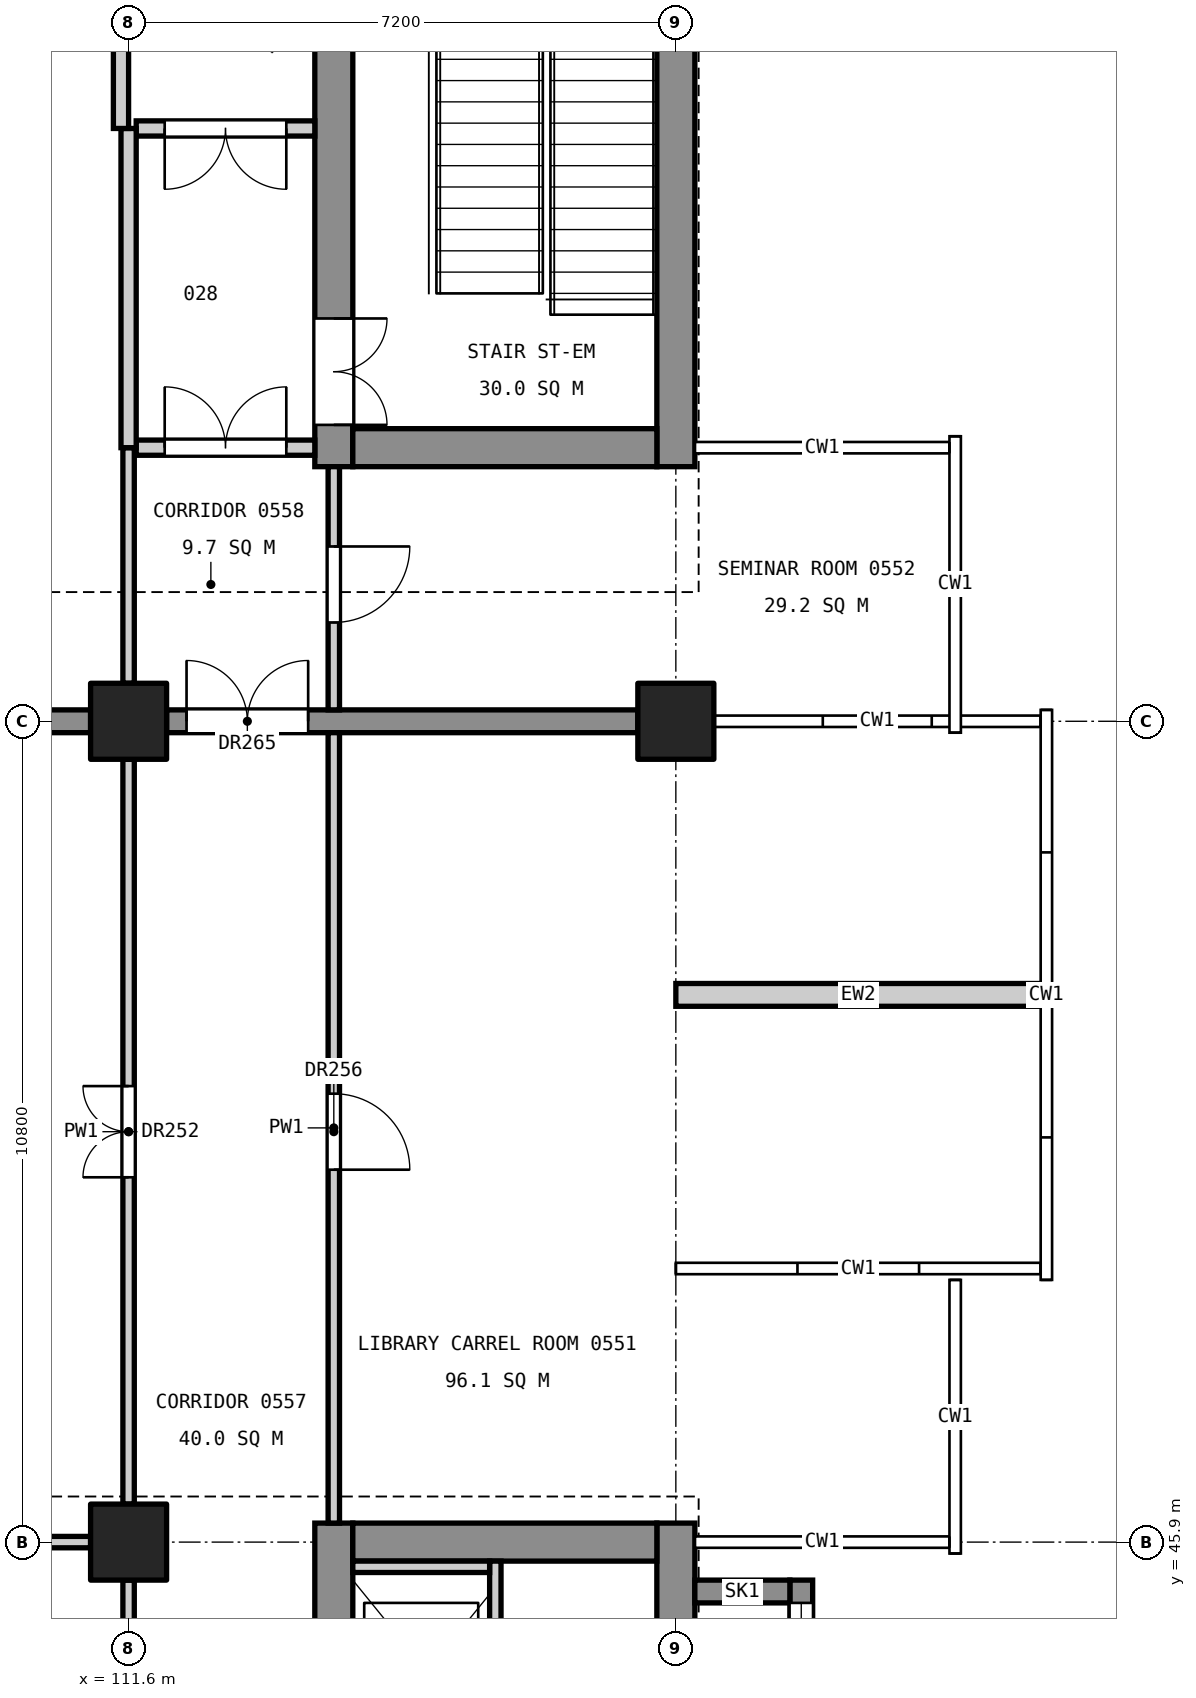
"""IFC4 building model, lengths in metres.
Left out: names, types, materials, properties, quantities, classifications, styles, units other than length and angle.
Written with IfcOpenShell. Run it as: python <this file> out.ifc"""

import sys

from ifc_helpers import new_model, si_unit, direction, frame, frame_2d, origin, origin_2d, place, context, subcontext, project, spatial, rectangle, extrude, element, fill, save


model = new_model("IFC4")
c1 = context("Model", 3, precision=1e-05, world=origin(), true_north=direction((0.0, 1.0)))
c2 = subcontext(c1, "Body", "Model", "MODEL_VIEW")
j1 = project(units=[si_unit("LENGTHUNIT", "METRE"), si_unit("PLANEANGLEUNIT", "RADIAN")], contexts=[c1])
p1 = place(None, origin())
s1 = spatial("IfcSite", under=j1, at=p1, CompositionType="ELEMENT")
p2 = place(p1, origin())
s2 = spatial("IfcBuilding", under=s1, at=p2, CompositionType="ELEMENT")
p3 = place(p2, frame((0.0, 0.0, 27.0)))
s3 = spatial("IfcBuildingStorey", under=s2, at=p3, CompositionType="ELEMENT", Elevation=27.0)
for number, where, z_axis, x_axis in (
    (1, (118.8, 56.7, 0.0), (0.0, 0.0, 1.0), (1.0, 0.0, 0.0)),
    (2, (111.6, 45.9, 0.0), (0.0, 0.0, 1.0), (1.0, 0.0, 0.0)),
    (3, (111.6, 56.7, 0.0), (0.0, 0.0, 1.0), (1.0, 0.0, 0.0)),
):
    element("IfcColumn", number, at=place(p3, frame(where, z_axis=z_axis, x_axis=x_axis)), inside=s3, PredefinedType="COLUMN", context=c2, shape_type="SweptSolid", body=[
        extrude(rectangle(XDim=1.0, YDim=1.0, at=origin_2d()), origin(), (0.0, 0.0, 1.0), 4.8),
    ])
p4 = place(p3, frame((118.8, 34.85, 0.0), z_axis=(0.0, 0.0, 1.0), x_axis=(0.0, 1.0, 0.0)))
e4 = element("IfcWall", 4, at=p4, inside=s3, PredefinedType="SHEAR", context=c2, shape_type="SweptSolid", body=[
    extrude(rectangle(XDim=11.3, YDim=0.5, at=frame_2d((5.65, 0.0))), origin(), (0.0, 0.0, 1.0), 4.55),
])
p5 = place(p4, frame((6.16, 0.0, 3.4)))
e5 = element("IfcOpeningElement", 5, at=p5, cuts=e4, PredefinedType="OPENING", context=c2, shape_type="SweptSolid", body=[
    extrude(rectangle(XDim=1.2, YDim=0.9, at=frame_2d((0.6, 0.45))), frame((0.0, 0.26, 0.0), z_axis=(0.0, -1.0, 0.0), x_axis=(1.0, 0.0, 0.0)), (0.0, 0.0, 1.0), 0.52),
])
p6 = place(p3, frame((114.3, 34.85, 0.0), z_axis=(0.0, 0.0, 1.0), x_axis=(0.0, 1.0, 0.0)))
e6 = element("IfcWall", 6, at=p6, inside=s3, PredefinedType="SHEAR", context=c2, shape_type="SweptSolid", body=[
    extrude(rectangle(XDim=11.3, YDim=0.5, at=frame_2d((5.65, 0.0))), origin(), (0.0, 0.0, 1.0), 4.55),
])
p7 = place(p6, frame((0.55, 0.0, 0.0)))
e7 = element("IfcOpeningElement", 7, at=p7, cuts=e6, PredefinedType="OPENING", context=c2, shape_type="SweptSolid", body=[
    extrude(rectangle(XDim=1.4, YDim=2.1, at=frame_2d((0.7, 1.05))), frame((0.0, 0.26, 0.0), z_axis=(0.0, -1.0, 0.0), x_axis=(1.0, 0.0, 0.0)), (0.0, 0.0, 1.0), 0.52),
])
p8 = place(p6, frame((8.8, 0.0, 0.0)))
e8 = element("IfcOpeningElement", 8, at=p8, cuts=e6, PredefinedType="OPENING", context=c2, shape_type="SweptSolid", body=[
    extrude(rectangle(XDim=1.1, YDim=2.1, at=frame_2d((0.55, 1.05))), frame((0.0, 0.26, 0.0), z_axis=(0.0, -1.0, 0.0), x_axis=(1.0, 0.0, 0.0)), (0.0, 0.0, 1.0), 0.52),
])
p9 = place(p3, frame((118.55, 45.9, 0.0), z_axis=(0.0, 0.0, 1.0), x_axis=(-1.0, 0.0, 0.0)))
e9 = element("IfcWall", 9, at=p9, inside=s3, PredefinedType="SHEAR", context=c2, shape_type="SweptSolid", body=[
    extrude(rectangle(XDim=4.0, YDim=0.5, at=frame_2d((2.0, 0.0))), origin(), (0.0, 0.0, 1.0), 4.55),
])
p10 = place(p3, frame((118.8, 60.05, 0.0), z_axis=(0.0, 0.0, 1.0), x_axis=(0.0, 1.0, 0.0)))
e10 = element("IfcWall", 10, at=p10, inside=s3, PredefinedType="SHEAR", context=c2, shape_type="SweptSolid", body=[
    extrude(rectangle(XDim=14.9, YDim=0.5, at=frame_2d((7.45, 0.0))), origin(), (0.0, 0.0, 1.0), 4.55),
])
p11 = place(p10, frame((6.16, 0.0, 3.4)))
e11 = element("IfcOpeningElement", 11, at=p11, cuts=e10, PredefinedType="OPENING", context=c2, shape_type="SweptSolid", body=[
    extrude(rectangle(XDim=1.2, YDim=0.9, at=frame_2d((0.6, 0.45))), frame((0.0, 0.26, 0.0), z_axis=(0.0, -1.0, 0.0), x_axis=(1.0, 0.0, 0.0)), (0.0, 0.0, 1.0), 0.52),
])
p12 = place(p3, frame((114.3, 60.05, 0.0), z_axis=(0.0, 0.0, 1.0), x_axis=(0.0, 1.0, 0.0)))
e12 = element("IfcWall", 12, at=p12, inside=s3, PredefinedType="SHEAR", context=c2, shape_type="SweptSolid", body=[
    extrude(rectangle(XDim=14.9, YDim=0.5, at=frame_2d((7.45, 0.0))), origin(), (0.0, 0.0, 1.0), 4.55),
])
p13 = place(p12, frame((0.55, 0.0, 0.0)))
e13 = element("IfcOpeningElement", 13, at=p13, cuts=e12, PredefinedType="OPENING", context=c2, shape_type="SweptSolid", body=[
    extrude(rectangle(XDim=1.4, YDim=2.1, at=frame_2d((0.7, 1.05))), frame((0.0, 0.26, 0.0), z_axis=(0.0, -1.0, 0.0), x_axis=(1.0, 0.0, 0.0)), (0.0, 0.0, 1.0), 0.52),
])
p14 = place(p12, frame((8.85, 0.0, 0.0)))
e14 = element("IfcOpeningElement", 14, at=p14, cuts=e12, PredefinedType="OPENING", context=c2, shape_type="SweptSolid", body=[
    extrude(rectangle(XDim=1.1, YDim=2.1, at=frame_2d((0.55, 1.05))), frame((0.0, 0.26, 0.0), z_axis=(0.0, -1.0, 0.0), x_axis=(1.0, 0.0, 0.0)), (0.0, 0.0, 1.0), 0.52),
])
p15 = place(p12, frame((11.4, 0.0, 0.0)))
e15 = element("IfcOpeningElement", 15, at=p15, cuts=e12, PredefinedType="OPENING", context=c2, shape_type="SweptSolid", body=[
    extrude(rectangle(XDim=1.1, YDim=2.1, at=frame_2d((0.55, 1.05))), frame((0.0, 0.26, 0.0), z_axis=(0.0, -1.0, 0.0), x_axis=(1.0, 0.0, 0.0)), (0.0, 0.0, 1.0), 0.52),
])
p16 = place(p3, frame((118.55, 60.3, 0.0), z_axis=(0.0, 0.0, 1.0), x_axis=(-1.0, 0.0, 0.0)))
e16 = element("IfcWall", 16, at=p16, inside=s3, PredefinedType="SHEAR", context=c2, shape_type="SweptSolid", body=[
    extrude(rectangle(XDim=4.0, YDim=0.5, at=frame_2d((2.0, 0.0))), origin(), (0.0, 0.0, 1.0), 4.55),
])
p17 = place(p3, frame((120.45, 43.0, 0.0), z_axis=(0.0, 0.0, 1.0), x_axis=(0.0, 1.0, 0.0)))
e17 = element("IfcWall", 17, at=p17, inside=s3, PredefinedType="SHEAR", context=c2, shape_type="SweptSolid", body=[
    extrude(rectangle(XDim=2.4, YDim=0.3, at=frame_2d((1.2, 0.0))), origin(), (0.0, 0.0, 1.0), 4.8),
])
p18 = place(p17, frame((0.3, 0.0, 3.0)))
e18 = element("IfcOpeningElement", 18, at=p18, cuts=e17, PredefinedType="OPENING", context=c2, shape_type="SweptSolid", body=[
    extrude(rectangle(XDim=1.8, YDim=1.2, at=frame_2d((0.9, 0.6))), frame((0.0, 0.16, 0.0), z_axis=(0.0, -1.0, 0.0), x_axis=(1.0, 0.0, 0.0)), (0.0, 0.0, 1.0), 0.32),
])
p19 = place(p3, frame((119.05, 45.25, 0.0), z_axis=(0.0, 0.0, 1.0), x_axis=(1.0, 0.0, 0.0)))
e19 = element("IfcWall", 19, at=p19, inside=s3, PredefinedType="SHEAR", context=c2, shape_type="SweptSolid", body=[
    extrude(rectangle(XDim=1.25, YDim=0.3, at=frame_2d((0.625, 0.0))), origin(), (0.0, 0.0, 1.0), 4.8),
])
p20 = place(p3, frame((118.3, 56.7, 0.0), z_axis=(0.0, 0.0, 1.0), x_axis=(-1.0, 0.0, 0.0)))
e20 = element("IfcWall", 20, at=p20, inside=s3, PredefinedType="SHEAR", context=c2, shape_type="SweptSolid", body=[
    extrude(rectangle(XDim=6.2, YDim=0.3, at=frame_2d((3.1, 0.0))), origin(), (0.0, 0.0, 1.0), 4.55),
])
p21 = place(p20, frame((4.337, 0.0, 0.0)))
e21 = element("IfcOpeningElement", 21, at=p21, cuts=e20, PredefinedType="OPENING", context=c2, shape_type="SweptSolid", body=[
    extrude(rectangle(XDim=1.6, YDim=2.1, at=frame_2d((0.8, 1.05))), frame((0.0, 0.16, 0.0), z_axis=(0.0, -1.0, 0.0), x_axis=(1.0, 0.0, 0.0)), (0.0, 0.0, 1.0), 0.32),
])
p22 = place(p3, frame((111.1, 56.7, 0.0), z_axis=(0.0, 0.0, 1.0), x_axis=(-1.0, 0.0, 0.0)))
e22 = element("IfcWall", 22, at=p22, inside=s3, PredefinedType="SHEAR", context=c2, shape_type="SweptSolid", body=[
    extrude(rectangle(XDim=9.8, YDim=0.3, at=frame_2d((4.9, 0.0))), origin(), (0.0, 0.0, 1.0), 4.55),
])
p23 = place(p3, frame((116.425, 43.0, 0.0), z_axis=(0.0, 0.0, 1.0), x_axis=(0.0, 1.0, 0.0)))
e23 = element("IfcWall", 23, at=p23, inside=s3, PredefinedType="SOLIDWALL", context=c2, shape_type="SweptSolid", body=[
    extrude(rectangle(XDim=2.65, YDim=0.15, at=frame_2d((1.325, 0.0))), origin(), (0.0, 0.0, 1.0), 4.8),
])
p24 = place(p3, frame((116.35, 45.575, 0.0), z_axis=(0.0, 0.0, 1.0), x_axis=(-1.0, 0.0, 0.0)))
e24 = element("IfcWall", 24, at=p24, inside=s3, PredefinedType="SOLIDWALL", context=c2, shape_type="SweptSolid", body=[
    extrude(rectangle(XDim=1.8, YDim=0.15, at=frame_2d((0.9, 0.0))), origin(), (0.0, 0.0, 1.0), 4.8),
])
p25 = place(p3, frame((123.6, 53.1, 0.0), z_axis=(0.0, 0.0, 1.0), x_axis=(-1.0, 0.0, 0.0)))
e25 = element("IfcWall", 25, at=p25, inside=s3, PredefinedType="STANDARD", context=c2, shape_type="SweptSolid", body=[
    extrude(rectangle(XDim=4.8, YDim=0.3, at=frame_2d((2.4, 0.0))), origin(), (0.0, 0.0, 1.0), 3.65),
])
p26 = place(p3, frame((114.3, 46.15, 0.0), z_axis=(0.0, 0.0, 1.0), x_axis=(0.0, 1.0, 0.0)))
e26 = element("IfcWall", 26, at=p26, inside=s3, PredefinedType="PARTITIONING", context=c2, shape_type="SweptSolid", body=[
    extrude(rectangle(XDim=10.4, YDim=0.15, at=frame_2d((5.2, 0.0))), origin(), (0.0, 0.0, 1.0), 3.55),
])
p27 = place(p26, frame((4.65, 0.0, 0.0)))
e27 = element("IfcOpeningElement", 27, at=p27, cuts=e26, PredefinedType="OPENING", context=c2, shape_type="SweptSolid", body=[
    extrude(rectangle(XDim=1.0, YDim=2.1, at=frame_2d((0.5, 1.05))), frame((0.0, 0.085, 0.0), z_axis=(0.0, -1.0, 0.0), x_axis=(1.0, 0.0, 0.0)), (0.0, 0.0, 1.0), 0.17),
])
p28 = place(p3, frame((114.3, 56.85, 0.0), z_axis=(0.0, 0.0, 1.0), x_axis=(0.0, 1.0, 0.0)))
e28 = element("IfcWall", 28, at=p28, inside=s3, PredefinedType="PARTITIONING", context=c2, shape_type="SweptSolid", body=[
    extrude(rectangle(XDim=3.2, YDim=0.15, at=frame_2d((1.6, 0.0))), origin(), (0.0, 0.0, 1.0), 3.55),
])
p29 = place(p28, frame((1.15, 0.0, 0.0)))
e29 = element("IfcOpeningElement", 29, at=p29, cuts=e28, PredefinedType="OPENING", context=c2, shape_type="SweptSolid", body=[
    extrude(rectangle(XDim=1.0, YDim=2.1, at=frame_2d((0.5, 1.05))), frame((0.0, 0.085, 0.0), z_axis=(0.0, -1.0, 0.0), x_axis=(1.0, 0.0, 0.0)), (0.0, 0.0, 1.0), 0.17),
])
p30 = place(p3, frame((114.05, 60.3, 0.0), z_axis=(0.0, 0.0, 1.0), x_axis=(-1.0, 0.0, 0.0)))
e30 = element("IfcWall", 30, at=p30, inside=s3, PredefinedType="PARTITIONING", context=c2, shape_type="SweptSolid", body=[
    extrude(rectangle(XDim=2.35, YDim=0.2, at=frame_2d((1.175, 0.0))), origin(), (0.0, 0.0, 1.0), 3.85),
])
p31 = place(p30, frame((0.375, 0.0, 0.0)))
e31 = element("IfcOpeningElement", 31, at=p31, cuts=e30, PredefinedType="OPENING", context=c2, shape_type="SweptSolid", body=[
    extrude(rectangle(XDim=1.6, YDim=2.1, at=frame_2d((0.8, 1.05))), frame((0.0, 0.11, 0.0), z_axis=(0.0, -1.0, 0.0), x_axis=(1.0, 0.0, 0.0)), (0.0, 0.0, 1.0), 0.22),
])
p32 = place(p3, frame((114.05, 64.5, 0.0), z_axis=(0.0, 0.0, 1.0), x_axis=(-1.0, 0.0, 0.0)))
e32 = element("IfcWall", 32, at=p32, inside=s3, PredefinedType="PARTITIONING", context=c2, shape_type="SweptSolid", body=[
    extrude(rectangle(XDim=2.35, YDim=0.2, at=frame_2d((1.175, 0.0))), origin(), (0.0, 0.0, 1.0), 3.55),
])
p33 = place(p32, frame((0.375, 0.0, 0.0)))
e33 = element("IfcOpeningElement", 33, at=p33, cuts=e32, PredefinedType="OPENING", context=c2, shape_type="SweptSolid", body=[
    extrude(rectangle(XDim=1.6, YDim=2.1, at=frame_2d((0.8, 1.05))), frame((0.0, 0.11, 0.0), z_axis=(0.0, -1.0, 0.0), x_axis=(1.0, 0.0, 0.0)), (0.0, 0.0, 1.0), 0.22),
])
p34 = place(p3, frame((111.6, 41.9, 0.0), z_axis=(0.0, 0.0, 1.0), x_axis=(0.0, 1.0, 0.0)))
e34 = element("IfcWall", 34, at=p34, inside=s3, PredefinedType="PARTITIONING", context=c2, shape_type="SweptSolid", body=[
    extrude(rectangle(XDim=3.5, YDim=0.15, at=frame_2d((1.75, 0.0))), origin(), (0.0, 0.0, 1.0), 3.55),
])
p35 = place(p34, frame((1.15, 0.0, 0.0)))
e35 = element("IfcOpeningElement", 35, at=p35, cuts=e34, PredefinedType="OPENING", context=c2, shape_type="SweptSolid", body=[
    extrude(rectangle(XDim=1.2, YDim=2.1, at=frame_2d((0.6, 1.05))), frame((0.0, 0.085, 0.0), z_axis=(0.0, -1.0, 0.0), x_axis=(1.0, 0.0, 0.0)), (0.0, 0.0, 1.0), 0.17),
])
p36 = place(p3, frame((111.6, 46.4, 0.0), z_axis=(0.0, 0.0, 1.0), x_axis=(0.0, 1.0, 0.0)))
e36 = element("IfcWall", 36, at=p36, inside=s3, PredefinedType="PARTITIONING", context=c2, shape_type="SweptSolid", body=[
    extrude(rectangle(XDim=9.8, YDim=0.15, at=frame_2d((4.9, 0.0))), origin(), (0.0, 0.0, 1.0), 3.55),
])
p37 = place(p36, frame((4.3, 0.0, 0.0)))
e37 = element("IfcOpeningElement", 37, at=p37, cuts=e36, PredefinedType="OPENING", context=c2, shape_type="SweptSolid", body=[
    extrude(rectangle(XDim=1.2, YDim=2.1, at=frame_2d((0.6, 1.05))), frame((0.0, 0.085, 0.0), z_axis=(0.0, -1.0, 0.0), x_axis=(1.0, 0.0, 0.0)), (0.0, 0.0, 1.0), 0.17),
])
p38 = place(p3, frame((111.6, 57.2, 0.0), z_axis=(0.0, 0.0, 1.0), x_axis=(0.0, 1.0, 0.0)))
e38 = element("IfcWall", 38, at=p38, inside=s3, PredefinedType="PARTITIONING", context=c2, shape_type="SweptSolid", body=[
    extrude(rectangle(XDim=3.1, YDim=0.15, at=frame_2d((1.55, 0.0))), origin(), (0.0, 0.0, 1.0), 3.55),
])
p39 = place(p3, frame((111.6, 60.3, 0.0), z_axis=(0.0, 0.0, 1.0), x_axis=(0.0, 1.0, 0.0)))
e39 = element("IfcWall", 39, at=p39, inside=s3, PredefinedType="PARTITIONING", context=c2, shape_type="SweptSolid", body=[
    extrude(rectangle(XDim=4.2, YDim=0.2, at=frame_2d((2.1, 0.0))), origin(), (0.0, 0.0, 1.0), 3.55),
])
p40 = place(p3, frame((111.5, 64.5, 0.0), z_axis=(0.0, 0.0, 1.0), x_axis=(0.0, 1.0, 0.0)))
e40 = element("IfcWall", 40, at=p40, inside=s3, PredefinedType="PARTITIONING", context=c2, shape_type="SweptSolid", body=[
    extrude(rectangle(XDim=2.5, YDim=0.2, at=frame_2d((1.25, 0.0))), origin(), (0.0, 0.0, 1.0), 3.55),
])
p41 = place(p3, frame((111.1, 45.9, 0.0), z_axis=(0.0, 0.0, 1.0), x_axis=(-1.0, 0.0, 0.0)))
e41 = element("IfcWall", 41, at=p41, inside=s3, PredefinedType="PARTITIONING", context=c2, shape_type="SweptSolid", body=[
    extrude(rectangle(XDim=9.8, YDim=0.15, at=frame_2d((4.9, 0.0))), origin(), (0.0, 0.0, 1.0), 3.85),
])
p42 = place(p13, frame((1.4, 0.0, 0.0), z_axis=(0.0, 0.0, 1.0), x_axis=(-1.0, 0.0, 0.0)))
e42 = element("IfcDoor", 42, at=p42, inside=s3, OperationType="DOUBLE_DOOR_SINGLE_SWING", PredefinedType="DOOR", context=c2, shape_type="SweptSolid", body=[
    extrude(rectangle(XDim=1.4, YDim=2.1, at=frame_2d((0.7, 1.05))), frame((0.0, 0.025, 0.0), z_axis=(0.0, -1.0, 0.0), x_axis=(1.0, 0.0, 0.0)), (0.0, 0.0, 1.0), 0.05),
])
fill(e13, e42)
p43 = place(p18, origin())
e43 = element("IfcWindow", 43, at=p43, inside=s3, PartitioningType="SINGLE_PANEL", PredefinedType="WINDOW", context=c2, shape_type="SweptSolid", body=[
    extrude(rectangle(XDim=1.8, YDim=1.2, at=frame_2d((0.9, 0.6))), frame((0.0, 0.03, 0.0), z_axis=(0.0, -1.0, 0.0), x_axis=(1.0, 0.0, 0.0)), (0.0, 0.0, 1.0), 0.06),
])
fill(e18, e43)
p44 = place(p37, origin())
e44 = element("IfcDoor", 44, at=p44, inside=s3, OperationType="DOUBLE_DOOR_SINGLE_SWING", PredefinedType="DOOR", context=c2, shape_type="SweptSolid", body=[
    extrude(rectangle(XDim=1.2, YDim=2.1, at=frame_2d((0.6, 1.05))), frame((0.0, 0.025, 0.0), z_axis=(0.0, -1.0, 0.0), x_axis=(1.0, 0.0, 0.0)), (0.0, 0.0, 1.0), 0.05),
])
fill(e37, e44)
p45 = place(p27, frame((1.0, 0.0, 0.0), z_axis=(0.0, 0.0, 1.0), x_axis=(-1.0, 0.0, 0.0)))
e45 = element("IfcDoor", 45, at=p45, inside=s3, OperationType="SINGLE_SWING_RIGHT", PredefinedType="DOOR", context=c2, shape_type="SweptSolid", body=[
    extrude(rectangle(XDim=1.0, YDim=2.1, at=frame_2d((0.5, 1.05))), frame((0.0, 0.025, 0.0), z_axis=(0.0, -1.0, 0.0), x_axis=(1.0, 0.0, 0.0)), (0.0, 0.0, 1.0), 0.05),
])
fill(e27, e45)
p46 = place(p29, frame((1.0, 0.0, 0.0), z_axis=(0.0, 0.0, 1.0), x_axis=(-1.0, 0.0, 0.0)))
e46 = element("IfcDoor", 46, at=p46, inside=s3, OperationType="SINGLE_SWING_LEFT", PredefinedType="DOOR", context=c2, shape_type="SweptSolid", body=[
    extrude(rectangle(XDim=1.0, YDim=2.1, at=frame_2d((0.5, 1.05))), frame((0.0, 0.025, 0.0), z_axis=(0.0, -1.0, 0.0), x_axis=(1.0, 0.0, 0.0)), (0.0, 0.0, 1.0), 0.05),
])
fill(e29, e46)
p47 = place(p31, frame((1.6, 0.0, 0.0), z_axis=(0.0, 0.0, 1.0), x_axis=(-1.0, 0.0, 0.0)))
e47 = element("IfcDoor", 47, at=p47, inside=s3, OperationType="DOUBLE_DOOR_SINGLE_SWING", PredefinedType="DOOR", context=c2, shape_type="SweptSolid", body=[
    extrude(rectangle(XDim=1.6, YDim=2.1, at=frame_2d((0.8, 1.05))), frame((0.0, 0.025, 0.0), z_axis=(0.0, -1.0, 0.0), x_axis=(1.0, 0.0, 0.0)), (0.0, 0.0, 1.0), 0.05),
])
fill(e31, e47)
p48 = place(p33, origin())
e48 = element("IfcDoor", 48, at=p48, inside=s3, OperationType="DOUBLE_DOOR_SINGLE_SWING", PredefinedType="DOOR", context=c2, shape_type="SweptSolid", body=[
    extrude(rectangle(XDim=1.6, YDim=2.1, at=frame_2d((0.8, 1.05))), frame((0.0, 0.025, 0.0), z_axis=(0.0, -1.0, 0.0), x_axis=(1.0, 0.0, 0.0)), (0.0, 0.0, 1.0), 0.05),
])
fill(e33, e48)
p49 = place(p21, frame((1.6, 0.0, 0.0), z_axis=(0.0, 0.0, 1.0), x_axis=(-1.0, 0.0, 0.0)))
e49 = element("IfcDoor", 49, at=p49, inside=s3, OperationType="DOUBLE_DOOR_SINGLE_SWING", PredefinedType="DOOR", context=c2, shape_type="SweptSolid", body=[
    extrude(rectangle(XDim=1.6, YDim=2.1, at=frame_2d((0.8, 1.05))), frame((0.0, 0.025, 0.0), z_axis=(0.0, -1.0, 0.0), x_axis=(1.0, 0.0, 0.0)), (0.0, 0.0, 1.0), 0.05),
])
fill(e21, e49)
save(model, sys.argv[1])
